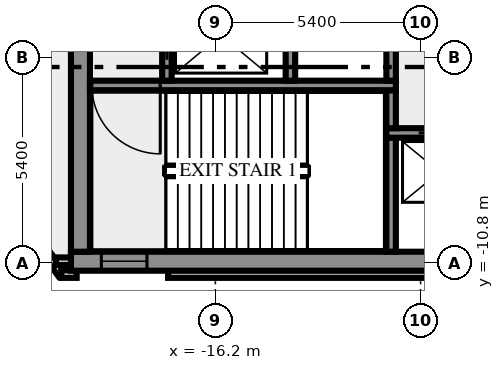
"""IFC4 building model, lengths in metres.
Left out: names, types, materials, properties, quantities, classifications, styles, units other than length and angle.
Written with IfcOpenShell. Run it as: python <this file> out.ifc"""

import sys

from ifc_helpers import new_model, si_unit, direction, frame, frame_2d, origin, place, context, subcontext, project, spatial, rectangle, extrude, element, fill, save


model = new_model("IFC4")
c1 = context("Model", 3, precision=1e-05, world=origin(), true_north=direction((0.0, 1.0)))
c2 = subcontext(c1, "Body", "Model", "MODEL_VIEW")
j1 = project(units=[si_unit("LENGTHUNIT", "METRE"), si_unit("PLANEANGLEUNIT", "RADIAN")], contexts=[c1])
p1 = place(None, origin())
s1 = spatial("IfcSite", under=j1, at=p1, CompositionType="ELEMENT")
p2 = place(p1, origin())
s2 = spatial("IfcBuilding", under=s1, at=p2, CompositionType="ELEMENT")
p3 = place(p2, frame((0.0, 0.0, 6.0)))
s3 = spatial("IfcBuildingStorey", under=s2, at=p3, CompositionType="ELEMENT", Elevation=6.0)
p4 = place(p3, frame((-21.833, -8.909, 0.0), z_axis=(0.0, 0.0, 1.0), x_axis=(0.587766567315, -0.809030569476, 0.0)))
e1 = element("IfcWall", 1, at=p4, inside=s3, PredefinedType="SOLIDWALL", context=c2, shape_type="SweptSolid", body=[
    extrude(rectangle(XDim=2.688, YDim=0.2, at=frame_2d((1.344, 0.0))), origin(), (0.0, 0.0, 1.0), 5.1),
])
p5 = place(p3, frame((-20.256, -11.088, 0.0), z_axis=(0.0, 0.0, 1.0), x_axis=(1.0, 0.0, 0.0)))
e2 = element("IfcWall", 2, at=p5, inside=s3, PredefinedType="SOLIDWALL", context=c2, shape_type="SweptSolid", body=[
    extrude(rectangle(XDim=0.406, YDim=0.2, at=frame_2d((0.203, 0.0))), origin(), (0.0, 0.0, 1.0), 5.1),
])
p6 = place(p3, frame((-17.444, -11.088, 0.0), z_axis=(0.0, 0.0, 1.0), x_axis=(1.0, 0.0, 0.0)))
e3 = element("IfcWall", 3, at=p6, inside=s3, PredefinedType="SOLIDWALL", context=c2, shape_type="SweptSolid", body=[
    extrude(rectangle(XDim=34.888, YDim=0.2, at=frame_2d((17.444, 0.0))), origin(), (0.0, 0.0, 1.0), 5.1),
])
p7 = place(p3, frame((-19.98, -10.75, 0.0), z_axis=(0.0, 0.0, 1.0), x_axis=(-1.0, 0.0, 0.0)))
e4 = element("IfcWall", 4, at=p7, inside=s3, PredefinedType="SOLIDWALL", context=c2, shape_type="SweptSolid", body=[
    extrude(rectangle(XDim=0.417, YDim=0.2, at=frame_2d((0.208, 0.0))), origin(), (0.0, 0.0, 1.0), 5.1),
])
p8 = place(p3, frame((-20.0, -10.75, 0.0), z_axis=(0.0, 0.0, 1.0), x_axis=(1.0, 0.0, 0.0)))
e5 = element("IfcWall", 5, at=p8, inside=s3, PredefinedType="SHEAR", context=c2, shape_type="SweptSolid", body=[
    extrude(rectangle(XDim=40.0, YDim=0.5, at=frame_2d((20.0, 0.0))), origin(), (0.0, 0.0, 1.0), 5.1),
])
p9 = place(p8, frame((0.8, 0.0, 1.0)))
e6 = element("IfcOpeningElement", 6, at=p9, cuts=e5, PredefinedType="OPENING", context=c2, shape_type="SweptSolid", body=[
    extrude(rectangle(XDim=1.2, YDim=1.2, at=frame_2d((0.6, 0.6))), frame((0.0, 0.26, 0.0), z_axis=(0.0, -1.0, 0.0), x_axis=(1.0, 0.0, 0.0)), (0.0, 0.0, 1.0), 0.52),
])
p10 = place(p8, frame((38.0, 0.0, 1.0)))
e7 = element("IfcOpeningElement", 7, at=p10, cuts=e5, PredefinedType="OPENING", context=c2, shape_type="SweptSolid", body=[
    extrude(rectangle(XDim=1.2, YDim=1.2, at=frame_2d((0.6, 0.6))), frame((0.0, 0.26, 0.0), z_axis=(0.0, -1.0, 0.0), x_axis=(1.0, 0.0, 0.0)), (0.0, 0.0, 1.0), 0.52),
])
p11 = place(p3, frame((-19.75, -10.5, 0.0), z_axis=(0.0, 0.0, 1.0), x_axis=(0.0, 1.0, 0.0)))
e8 = element("IfcWall", 8, at=p11, inside=s3, PredefinedType="SHEAR", context=c2, shape_type="SweptSolid", body=[
    extrude(rectangle(XDim=8.8, YDim=0.5, at=frame_2d((4.4, 0.0))), origin(), (0.0, 0.0, 1.0), 5.1),
])
p12 = place(p3, frame((-11.575, -10.5, 0.0), z_axis=(0.0, 0.0, 1.0), x_axis=(0.0, 1.0, 0.0)))
e9 = element("IfcWall", 9, at=p12, inside=s3, PredefinedType="SHEAR", context=c2, shape_type="SweptSolid", body=[
    extrude(rectangle(XDim=3.0, YDim=0.25, at=frame_2d((1.5, 0.0))), origin(), (0.0, 0.0, 1.0), 5.1),
])
p13 = place(p3, frame((11.7, -7.375, 0.0), z_axis=(0.0, 0.0, 1.0), x_axis=(-1.0, 0.0, 0.0)))
e10 = element("IfcWall", 10, at=p13, inside=s3, PredefinedType="SHEAR", context=c2, shape_type="SweptSolid", body=[
    extrude(rectangle(XDim=23.4, YDim=0.25, at=frame_2d((11.7, 0.0))), origin(), (0.0, 0.0, 1.0), 5.1),
])
p14 = place(p13, frame((21.45, 0.0, 0.0)))
e11 = element("IfcOpeningElement", 11, at=p14, cuts=e10, PredefinedType="OPENING", context=c2, shape_type="SweptSolid", body=[
    extrude(rectangle(XDim=1.1, YDim=2.1, at=frame_2d((0.55, 1.05))), frame((0.0, 0.135, 0.0), z_axis=(0.0, -1.0, 0.0), x_axis=(1.0, 0.0, 0.0)), (0.0, 0.0, 1.0), 0.27),
])
p15 = place(p13, frame((18.95, 0.0, 0.0)))
e12 = element("IfcOpeningElement", 12, at=p15, cuts=e10, PredefinedType="OPENING", context=c2, shape_type="SweptSolid", body=[
    extrude(rectangle(XDim=1.1, YDim=2.1, at=frame_2d((0.55, 1.05))), frame((0.0, 0.135, 0.0), z_axis=(0.0, -1.0, 0.0), x_axis=(1.0, 0.0, 0.0)), (0.0, 0.0, 1.0), 0.27),
])
p16 = place(p13, frame((16.45, 0.0, 0.0)))
e13 = element("IfcOpeningElement", 13, at=p16, cuts=e10, PredefinedType="OPENING", context=c2, shape_type="SweptSolid", body=[
    extrude(rectangle(XDim=1.1, YDim=2.1, at=frame_2d((0.55, 1.05))), frame((0.0, 0.135, 0.0), z_axis=(0.0, -1.0, 0.0), x_axis=(1.0, 0.0, 0.0)), (0.0, 0.0, 1.0), 0.27),
])
p17 = place(p13, frame((14.65, 0.0, 0.0)))
e14 = element("IfcOpeningElement", 14, at=p17, cuts=e10, PredefinedType="OPENING", context=c2, shape_type="SweptSolid", body=[
    extrude(rectangle(XDim=0.8, YDim=2.1, at=frame_2d((0.4, 1.05))), frame((0.0, 0.135, 0.0), z_axis=(0.0, -1.0, 0.0), x_axis=(1.0, 0.0, 0.0)), (0.0, 0.0, 1.0), 0.27),
])
p18 = place(p13, frame((12.8, 0.0, 0.0)))
e15 = element("IfcOpeningElement", 15, at=p18, cuts=e10, PredefinedType="OPENING", context=c2, shape_type="SweptSolid", body=[
    extrude(rectangle(XDim=0.9, YDim=2.1, at=frame_2d((0.45, 1.05))), frame((0.0, 0.135, 0.0), z_axis=(0.0, -1.0, 0.0), x_axis=(1.0, 0.0, 0.0)), (0.0, 0.0, 1.0), 0.27),
])
p19 = place(p13, frame((10.7, 0.0, 0.0)))
e16 = element("IfcOpeningElement", 16, at=p19, cuts=e10, PredefinedType="OPENING", context=c2, shape_type="SweptSolid", body=[
    extrude(rectangle(XDim=0.9, YDim=2.1, at=frame_2d((0.45, 1.05))), frame((0.0, 0.135, 0.0), z_axis=(0.0, -1.0, 0.0), x_axis=(1.0, 0.0, 0.0)), (0.0, 0.0, 1.0), 0.27),
])
p20 = place(p3, frame((-11.575, -7.25, 0.0), z_axis=(0.0, 0.0, 1.0), x_axis=(0.0, 1.0, 0.0)))
e17 = element("IfcWall", 17, at=p20, inside=s3, PredefinedType="SHEAR", context=c2, shape_type="SweptSolid", body=[
    extrude(rectangle(XDim=1.0, YDim=0.25, at=frame_2d((0.5, 0.0))), origin(), (0.0, 0.0, 1.0), 5.1),
])
p21 = place(p3, frame((-11.45, -6.125, 0.0), z_axis=(0.0, 0.0, 1.0), x_axis=(-1.0, 0.0, 0.0)))
e18 = element("IfcWall", 18, at=p21, inside=s3, PredefinedType="SHEAR", context=c2, shape_type="SweptSolid", body=[
    extrude(rectangle(XDim=8.05, YDim=0.25, at=frame_2d((4.025, 0.0))), origin(), (0.0, 0.0, 1.0), 5.1),
])
p22 = place(p21, frame((6.2, 0.0, 0.0)))
e19 = element("IfcOpeningElement", 19, at=p22, cuts=e18, PredefinedType="OPENING", context=c2, shape_type="SweptSolid", body=[
    extrude(rectangle(XDim=1.8, YDim=2.1, at=frame_2d((0.9, 1.05))), frame((0.0, 0.135, 0.0), z_axis=(0.0, -1.0, 0.0), x_axis=(1.0, 0.0, 0.0)), (0.0, 0.0, 1.0), 0.27),
])
p23 = place(p3, frame((-17.475, -6.0, 0.0), z_axis=(0.0, 0.0, 1.0), x_axis=(0.0, 1.0, 0.0)))
e20 = element("IfcWall", 20, at=p23, inside=s3, PredefinedType="SHEAR", context=c2, shape_type="SweptSolid", body=[
    extrude(rectangle(XDim=4.3, YDim=0.25, at=frame_2d((2.15, 0.0))), origin(), (0.0, 0.0, 1.0), 5.1),
])
p24 = place(p23, frame((0.55, 0.0, 0.0)))
e21 = element("IfcOpeningElement", 21, at=p24, cuts=e20, PredefinedType="OPENING", context=c2, shape_type="SweptSolid", body=[
    extrude(rectangle(XDim=1.3, YDim=2.1, at=frame_2d((0.65, 1.05))), frame((0.0, 0.135, 0.0), z_axis=(0.0, -1.0, 0.0), x_axis=(1.0, 0.0, 0.0)), (0.0, 0.0, 1.0), 0.27),
])
p25 = place(p3, frame((-14.225, -6.0, 0.0), z_axis=(0.0, 0.0, 1.0), x_axis=(0.0, 1.0, 0.0)))
e22 = element("IfcWall", 22, at=p25, inside=s3, PredefinedType="SHEAR", context=c2, shape_type="SweptSolid", body=[
    extrude(rectangle(XDim=4.3, YDim=0.25, at=frame_2d((2.15, 0.0))), origin(), (0.0, 0.0, 1.0), 5.1),
])
p26 = place(p3, frame((-11.575, -6.0, 0.0), z_axis=(0.0, 0.0, 1.0), x_axis=(0.0, 1.0, 0.0)))
e23 = element("IfcWall", 23, at=p26, inside=s3, PredefinedType="SHEAR", context=c2, shape_type="SweptSolid", body=[
    extrude(rectangle(XDim=1.75, YDim=0.25, at=frame_2d((0.875, 0.0))), origin(), (0.0, 0.0, 1.0), 5.1),
])
p27 = place(p9, origin())
e24 = element("IfcWindow", 24, at=p27, inside=s3, PartitioningType="SINGLE_PANEL", PredefinedType="WINDOW", context=c2, shape_type="SweptSolid", body=[
    extrude(rectangle(XDim=1.2, YDim=1.2, at=frame_2d((0.6, 0.6))), frame((0.0, 0.03, 0.0), z_axis=(0.0, -1.0, 0.0), x_axis=(1.0, 0.0, 0.0)), (0.0, 0.0, 1.0), 0.06),
])
fill(e6, e24)
p28 = place(p14, origin())
e25 = element("IfcDoor", 25, at=p28, inside=s3, OperationType="DOUBLE_DOOR_SLIDING", PredefinedType="DOOR", context=c2, shape_type="SweptSolid", body=[
    extrude(rectangle(XDim=1.1, YDim=2.1, at=frame_2d((0.55, 1.05))), frame((0.0, 0.025, 0.0), z_axis=(0.0, -1.0, 0.0), x_axis=(1.0, 0.0, 0.0)), (0.0, 0.0, 1.0), 0.05),
])
fill(e11, e25)
p29 = place(p22, origin())
e26 = element("IfcDoor", 26, at=p29, inside=s3, OperationType="DOUBLE_DOOR_SINGLE_SWING", PredefinedType="DOOR", context=c2, shape_type="SweptSolid", body=[
    extrude(rectangle(XDim=1.8, YDim=2.1, at=frame_2d((0.9, 1.05))), frame((0.0, 0.025, 0.0), z_axis=(0.0, -1.0, 0.0), x_axis=(1.0, 0.0, 0.0)), (0.0, 0.0, 1.0), 0.05),
])
fill(e19, e26)
p30 = place(p24, origin())
e27 = element("IfcDoor", 27, at=p30, inside=s3, OperationType="DOUBLE_DOOR_SLIDING", PredefinedType="DOOR", context=c2, shape_type="SweptSolid", body=[
    extrude(rectangle(XDim=1.3, YDim=2.1, at=frame_2d((0.65, 1.05))), frame((0.0, 0.025, 0.0), z_axis=(0.0, -1.0, 0.0), x_axis=(1.0, 0.0, 0.0)), (0.0, 0.0, 1.0), 0.05),
])
fill(e21, e27)
save(model, sys.argv[1])
